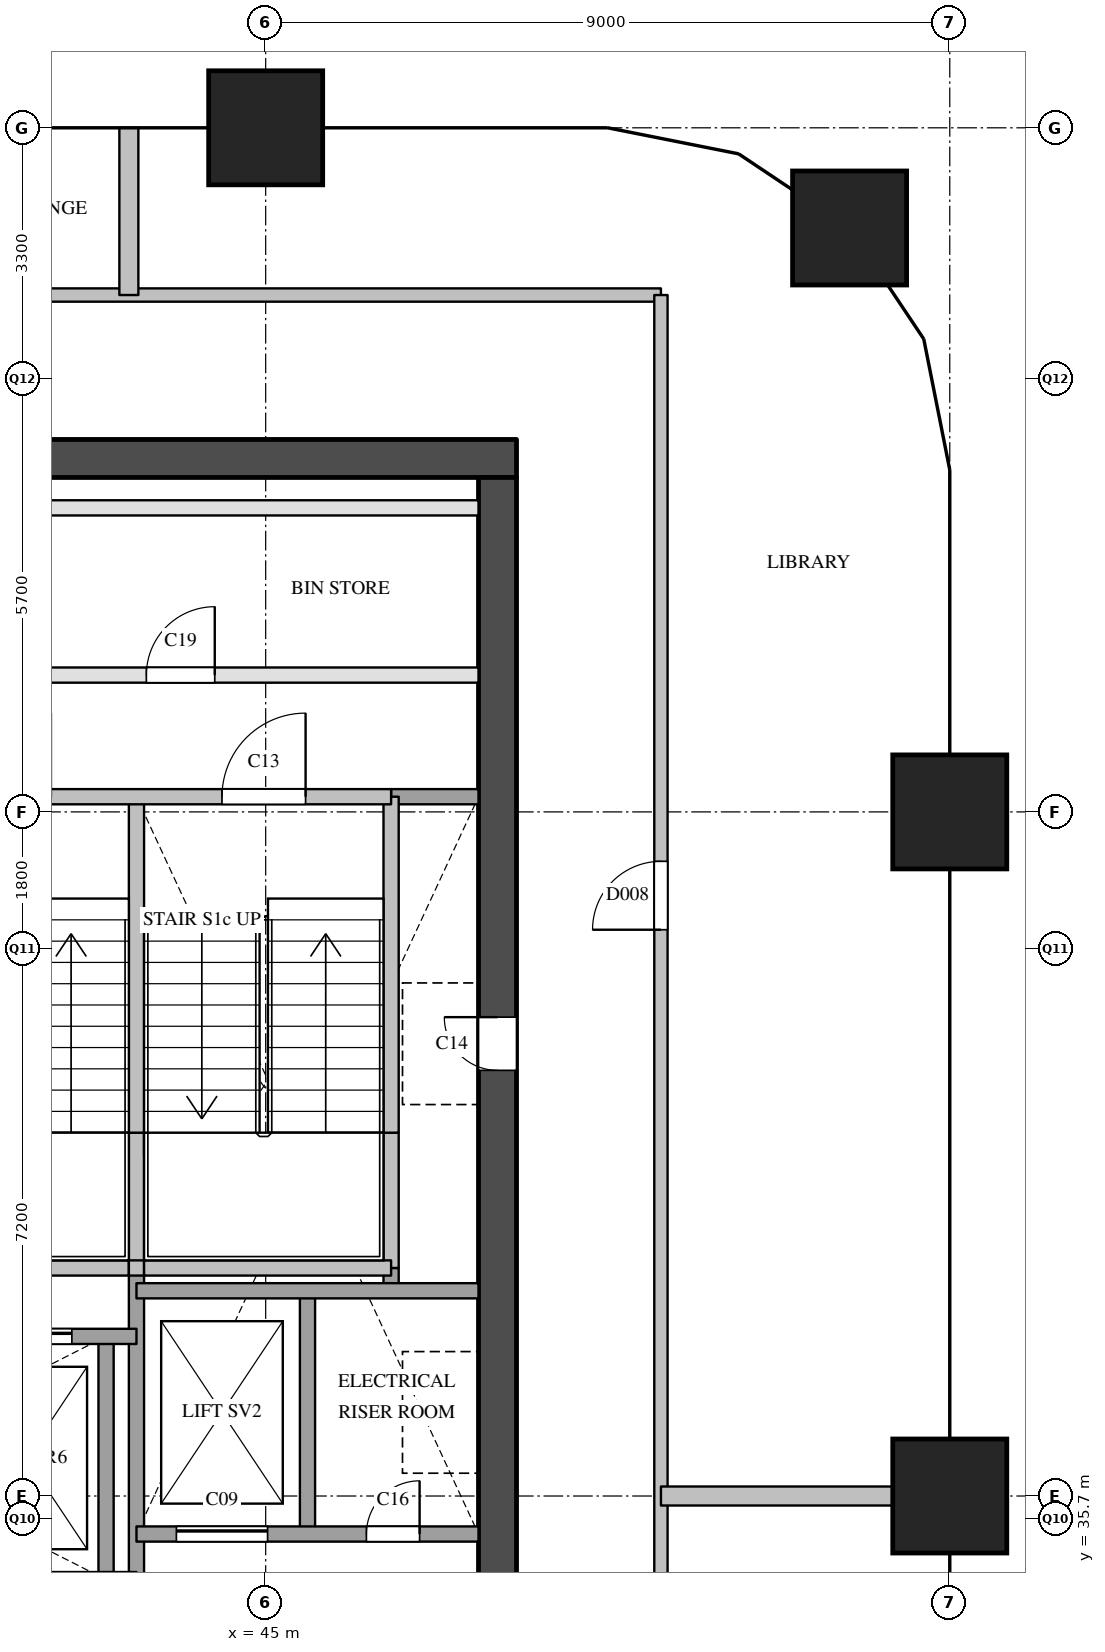
"""IFC4 building model, lengths in metres.
Left out: names, types, materials, properties, quantities, classifications, styles, units other than length and angle.
Written with IfcOpenShell. Run it as: python <this file> out.ifc"""

import sys

from ifc_helpers import new_model, si_unit, direction, frame, frame_2d, origin, origin_2d, place, context, subcontext, project, spatial, rectangle, extrude, element, fill, save


model = new_model("IFC4")
c1 = context("Model", 3, precision=1e-05, world=origin(), true_north=direction((0.0, 1.0)))
c2 = subcontext(c1, "Body", "Model", "MODEL_VIEW")
j1 = project(units=[si_unit("LENGTHUNIT", "METRE"), si_unit("PLANEANGLEUNIT", "RADIAN")], contexts=[c1])
p1 = place(None, origin())
s1 = spatial("IfcSite", under=j1, at=p1, CompositionType="ELEMENT")
p2 = place(p1, origin())
s2 = spatial("IfcBuilding", under=s1, at=p2, CompositionType="ELEMENT")
p3 = place(p2, frame((0.0, 0.0, 185.6)))
s3 = spatial("IfcBuildingStorey", under=s2, at=p3, CompositionType="ELEMENT", Elevation=185.6)
for number, where, z_axis, x_axis in (
    (1, (45.0, 54.0, 0.0), (0.0, 0.0, 1.0), (1.0, 0.0, 0.0)),
    (2, (54.0, 36.0, 0.0), (0.0, 0.0, 1.0), (1.0, 0.0, 0.0)),
    (3, (54.0, 45.0, 0.0), (0.0, 0.0, 1.0), (1.0, 0.0, 0.0)),
    (4, (52.682, 52.682, 0.0), (0.0, 0.0, 1.0), (1.0, 0.0, 0.0)),
):
    element("IfcColumn", number, at=place(p3, frame(where, z_axis=z_axis, x_axis=x_axis)), inside=s3, PredefinedType="COLUMN", context=c2, shape_type="SweptSolid", body=[
        extrude(rectangle(XDim=1.5, YDim=1.5, at=origin_2d()), origin(), (0.0, 0.0, 1.0), 3.9),
    ])
p4 = place(p3, frame((36.1, 49.65, 0.0), z_axis=(0.0, 0.0, 1.0), x_axis=(1.0, 0.0, 0.0)))
e5 = element("IfcWall", 5, at=p4, inside=s3, PredefinedType="SHEAR", context=c2, shape_type="SweptSolid", body=[
    extrude(rectangle(XDim=12.2, YDim=0.5, at=frame_2d((6.1, 0.0))), origin(), (0.0, 0.0, 1.0), 3.6),
])
p5 = place(p3, frame((48.05, 29.1, 0.0), z_axis=(0.0, 0.0, 1.0), x_axis=(0.0, 1.0, 0.0)))
e6 = element("IfcWall", 6, at=p5, inside=s3, PredefinedType="SHEAR", context=c2, shape_type="SweptSolid", body=[
    extrude(rectangle(XDim=20.3, YDim=0.5, at=frame_2d((10.15, 0.0))), origin(), (0.0, 0.0, 1.0), 3.6),
])
p6 = place(p5, frame((12.5, 0.0, 0.0)))
e7 = element("IfcOpeningElement", 7, at=p6, cuts=e6, PredefinedType="OPENING", context=c2, shape_type="SweptSolid", body=[
    extrude(rectangle(XDim=0.7, YDim=2.1, at=frame_2d((0.35, 1.05))), frame((0.0, 0.26, 0.0), z_axis=(0.0, -1.0, 0.0), x_axis=(1.0, 0.0, 0.0)), (0.0, 0.0, 1.0), 0.52),
])
p7 = place(p5, frame((3.9, 0.0, 0.0)))
e8 = element("IfcOpeningElement", 8, at=p7, cuts=e6, PredefinedType="OPENING", context=c2, shape_type="SweptSolid", body=[
    extrude(rectangle(XDim=1.8, YDim=2.1, at=frame_2d((0.9, 1.05))), frame((0.0, 0.26, 0.0), z_axis=(0.0, -1.0, 0.0), x_axis=(1.0, 0.0, 0.0)), (0.0, 0.0, 1.0), 0.52),
])
p8 = place(p3, frame((42.9, 34.9, 0.0), z_axis=(0.0, 0.0, 1.0), x_axis=(0.0, 1.0, 0.0)))
e9 = element("IfcWall", 9, at=p8, inside=s3, PredefinedType="SOLIDWALL", context=c2, shape_type="SweptSolid", body=[
    extrude(rectangle(XDim=3.2, YDim=0.2, at=frame_2d((1.6, 0.0))), origin(), (0.0, 0.0, 1.0), 3.6),
])
p9 = place(p3, frame((43.3, 29.1, 0.0), z_axis=(0.0, 0.0, 1.0), x_axis=(0.0, 1.0, 0.0)))
e10 = element("IfcWall", 10, at=p9, inside=s3, PredefinedType="SOLIDWALL", context=c2, shape_type="SweptSolid", body=[
    extrude(rectangle(XDim=9.9, YDim=0.2, at=frame_2d((4.95, 0.0))), origin(), (0.0, 0.0, 1.0), 3.6),
])
p10 = place(p3, frame((43.3, 39.0, 0.0), z_axis=(0.0, 0.0, 1.0), x_axis=(0.0, 1.0, 0.0)))
e11 = element("IfcWall", 11, at=p10, inside=s3, PredefinedType="SOLIDWALL", context=c2, shape_type="SweptSolid", body=[
    extrude(rectangle(XDim=1.78, YDim=0.2, at=frame_2d((0.89, 0.0))), origin(), (0.0, 0.0, 1.0), 3.6),
])
p11 = place(p3, frame((43.3, 40.78, 0.0), z_axis=(0.0, 0.0, 1.0), x_axis=(0.0, 1.0, 0.0)))
e12 = element("IfcWall", 12, at=p11, inside=s3, PredefinedType="SOLIDWALL", context=c2, shape_type="SweptSolid", body=[
    extrude(rectangle(XDim=4.42, YDim=0.2, at=frame_2d((2.21, 0.0))), origin(), (0.0, 0.0, 1.0), 3.6),
])
p12 = place(p3, frame((45.55, 35.5, 0.0), z_axis=(0.0, 0.0, 1.0), x_axis=(0.0, 1.0, 0.0)))
e13 = element("IfcWall", 13, at=p12, inside=s3, PredefinedType="SOLIDWALL", context=c2, shape_type="SweptSolid", body=[
    extrude(rectangle(XDim=3.2, YDim=0.2, at=frame_2d((1.6, 0.0))), origin(), (0.0, 0.0, 1.0), 3.6),
])
p13 = place(p3, frame((46.65, 38.7, 0.0), z_axis=(0.0, 0.0, 1.0), x_axis=(0.0, 1.0, 0.0)))
e14 = element("IfcWall", 14, at=p13, inside=s3, PredefinedType="SOLIDWALL", context=c2, shape_type="SweptSolid", body=[
    extrude(rectangle(XDim=0.3, YDim=0.2, at=frame_2d((0.15, 0.0))), origin(), (0.0, 0.0, 1.0), 3.6),
])
p14 = place(p3, frame((46.65, 39.0, 0.0), z_axis=(0.0, 0.0, 1.0), x_axis=(0.0, 1.0, 0.0)))
e15 = element("IfcWall", 15, at=p14, inside=s3, PredefinedType="SOLIDWALL", context=c2, shape_type="SweptSolid", body=[
    extrude(rectangle(XDim=1.78, YDim=0.2, at=frame_2d((0.89, 0.0))), origin(), (0.0, 0.0, 1.0), 3.6),
])
p15 = place(p3, frame((46.65, 40.78, 0.0), z_axis=(0.0, 0.0, 1.0), x_axis=(0.0, 1.0, 0.0)))
e16 = element("IfcWall", 16, at=p15, inside=s3, PredefinedType="SOLIDWALL", context=c2, shape_type="SweptSolid", body=[
    extrude(rectangle(XDim=4.42, YDim=0.2, at=frame_2d((2.21, 0.0))), origin(), (0.0, 0.0, 1.0), 3.6),
])
p16 = place(p3, frame((43.3, 35.5, 0.0), z_axis=(0.0, 0.0, 1.0), x_axis=(1.0, 0.0, 0.0)))
e17 = element("IfcWall", 17, at=p16, inside=s3, PredefinedType="SOLIDWALL", context=c2, shape_type="SweptSolid", body=[
    extrude(rectangle(XDim=4.5, YDim=0.2, at=frame_2d((2.25, 0.0))), origin(), (0.0, 0.0, 1.0), 3.6),
])
p17 = place(p16, frame((0.525, 0.0, 0.0)))
e18 = element("IfcOpeningElement", 18, at=p17, cuts=e17, PredefinedType="OPENING", context=c2, shape_type="SweptSolid", body=[
    extrude(rectangle(XDim=1.2, YDim=2.1, at=frame_2d((0.6, 1.05))), frame((0.0, 0.11, 0.0), z_axis=(0.0, -1.0, 0.0), x_axis=(1.0, 0.0, 0.0)), (0.0, 0.0, 1.0), 0.22),
])
p18 = place(p16, frame((3.025, 0.0, 0.0)))
e19 = element("IfcOpeningElement", 19, at=p18, cuts=e17, PredefinedType="OPENING", context=c2, shape_type="SweptSolid", body=[
    extrude(rectangle(XDim=0.7, YDim=2.1, at=frame_2d((0.35, 1.05))), frame((0.0, 0.11, 0.0), z_axis=(0.0, -1.0, 0.0), x_axis=(1.0, 0.0, 0.0)), (0.0, 0.0, 1.0), 0.22),
])
p19 = place(p3, frame((36.6, 38.1, 0.0), z_axis=(0.0, 0.0, 1.0), x_axis=(1.0, 0.0, 0.0)))
e20 = element("IfcWall", 20, at=p19, inside=s3, PredefinedType="SOLIDWALL", context=c2, shape_type="SweptSolid", body=[
    extrude(rectangle(XDim=6.7, YDim=0.2, at=frame_2d((3.35, 0.0))), origin(), (0.0, 0.0, 1.0), 3.6),
])
p20 = place(p19, frame((0.45, 0.0, 0.0)))
e21 = element("IfcOpeningElement", 21, at=p20, cuts=e20, PredefinedType="OPENING", context=c2, shape_type="SweptSolid", body=[
    extrude(rectangle(XDim=1.2, YDim=2.1, at=frame_2d((0.6, 1.05))), frame((0.0, 0.11, 0.0), z_axis=(0.0, -1.0, 0.0), x_axis=(1.0, 0.0, 0.0)), (0.0, 0.0, 1.0), 0.22),
])
p21 = place(p19, frame((2.55, 0.0, 0.0)))
e22 = element("IfcOpeningElement", 22, at=p21, cuts=e20, PredefinedType="OPENING", context=c2, shape_type="SweptSolid", body=[
    extrude(rectangle(XDim=1.2, YDim=2.1, at=frame_2d((0.6, 1.05))), frame((0.0, 0.11, 0.0), z_axis=(0.0, -1.0, 0.0), x_axis=(1.0, 0.0, 0.0)), (0.0, 0.0, 1.0), 0.22),
])
p22 = place(p19, frame((4.65, 0.0, 0.0)))
e23 = element("IfcOpeningElement", 23, at=p22, cuts=e20, PredefinedType="OPENING", context=c2, shape_type="SweptSolid", body=[
    extrude(rectangle(XDim=1.2, YDim=2.1, at=frame_2d((0.6, 1.05))), frame((0.0, 0.11, 0.0), z_axis=(0.0, -1.0, 0.0), x_axis=(1.0, 0.0, 0.0)), (0.0, 0.0, 1.0), 0.22),
])
p23 = place(p3, frame((43.3, 38.7, 0.0), z_axis=(0.0, 0.0, 1.0), x_axis=(1.0, 0.0, 0.0)))
e24 = element("IfcWall", 24, at=p23, inside=s3, PredefinedType="SOLIDWALL", context=c2, shape_type="SweptSolid", body=[
    extrude(rectangle(XDim=4.5, YDim=0.2, at=frame_2d((2.25, 0.0))), origin(), (0.0, 0.0, 1.0), 3.6),
])
p24 = place(p3, frame((40.05, 39.0, 0.0), z_axis=(0.0, 0.0, 1.0), x_axis=(1.0, 0.0, 0.0)))
e25 = element("IfcWall", 25, at=p24, inside=s3, PredefinedType="SOLIDWALL", context=c2, shape_type="SweptSolid", body=[
    extrude(rectangle(XDim=3.15, YDim=0.2, at=frame_2d((1.575, 0.0))), origin(), (0.0, 0.0, 1.0), 3.6),
])
p25 = place(p3, frame((43.2, 39.0, 0.0), z_axis=(0.0, 0.0, 1.0), x_axis=(1.0, 0.0, 0.0)))
e26 = element("IfcWall", 26, at=p25, inside=s3, PredefinedType="SOLIDWALL", context=c2, shape_type="SweptSolid", body=[
    extrude(rectangle(XDim=0.2, YDim=0.2, at=frame_2d((0.1, 0.0))), origin(), (0.0, 0.0, 1.0), 3.6),
])
p26 = place(p3, frame((43.4, 39.0, 0.0), z_axis=(0.0, 0.0, 1.0), x_axis=(1.0, 0.0, 0.0)))
e27 = element("IfcWall", 27, at=p26, inside=s3, PredefinedType="SOLIDWALL", context=c2, shape_type="SweptSolid", body=[
    extrude(rectangle(XDim=3.25, YDim=0.2, at=frame_2d((1.625, 0.0))), origin(), (0.0, 0.0, 1.0), 3.6),
])
p27 = place(p3, frame((46.65, 45.2, 0.0), z_axis=(0.0, 0.0, 1.0), x_axis=(1.0, 0.0, 0.0)))
e28 = element("IfcWall", 28, at=p27, inside=s3, PredefinedType="SOLIDWALL", context=c2, shape_type="SweptSolid", body=[
    extrude(rectangle(XDim=1.15, YDim=0.2, at=frame_2d((0.575, 0.0))), origin(), (0.0, 0.0, 1.0), 3.6),
])
p28 = place(p3, frame((36.6, 45.2, 0.0), z_axis=(0.0, 0.0, 1.0), x_axis=(1.0, 0.0, 0.0)))
e29 = element("IfcWall", 29, at=p28, inside=s3, PredefinedType="SOLIDWALL", context=c2, shape_type="SweptSolid", body=[
    extrude(rectangle(XDim=10.05, YDim=0.2, at=frame_2d((5.025, 0.0))), origin(), (0.0, 0.0, 1.0), 3.6),
])
p29 = place(p28, frame((1.125, 0.0, 0.0)))
e30 = element("IfcOpeningElement", 30, at=p29, cuts=e29, PredefinedType="OPENING", context=c2, shape_type="SweptSolid", body=[
    extrude(rectangle(XDim=1.1, YDim=2.1, at=frame_2d((0.55, 1.05))), frame((0.0, 0.11, 0.0), z_axis=(0.0, -1.0, 0.0), x_axis=(1.0, 0.0, 0.0)), (0.0, 0.0, 1.0), 0.22),
])
p30 = place(p28, frame((4.475, 0.0, 0.0)))
e31 = element("IfcOpeningElement", 31, at=p30, cuts=e29, PredefinedType="OPENING", context=c2, shape_type="SweptSolid", body=[
    extrude(rectangle(XDim=1.1, YDim=2.1, at=frame_2d((0.55, 1.05))), frame((0.0, 0.11, 0.0), z_axis=(0.0, -1.0, 0.0), x_axis=(1.0, 0.0, 0.0)), (0.0, 0.0, 1.0), 0.22),
])
p31 = place(p28, frame((7.825, 0.0, 0.0)))
e32 = element("IfcOpeningElement", 32, at=p31, cuts=e29, PredefinedType="OPENING", context=c2, shape_type="SweptSolid", body=[
    extrude(rectangle(XDim=1.1, YDim=2.1, at=frame_2d((0.55, 1.05))), frame((0.0, 0.11, 0.0), z_axis=(0.0, -1.0, 0.0), x_axis=(1.0, 0.0, 0.0)), (0.0, 0.0, 1.0), 0.22),
])
p32 = place(p3, frame((36.6, 46.8, 0.0), z_axis=(0.0, 0.0, 1.0), x_axis=(1.0, 0.0, 0.0)))
e33 = element("IfcWall", 33, at=p32, inside=s3, PredefinedType="PARTITIONING", context=c2, shape_type="SweptSolid", body=[
    extrude(rectangle(XDim=11.2, YDim=0.2, at=frame_2d((5.6, 0.0))), origin(), (0.0, 0.0, 1.0), 3.6),
])
p33 = place(p32, frame((1.23, 0.0, 0.0)))
e34 = element("IfcOpeningElement", 34, at=p33, cuts=e33, PredefinedType="OPENING", context=c2, shape_type="SweptSolid", body=[
    extrude(rectangle(XDim=0.9, YDim=2.1, at=frame_2d((0.45, 1.05))), frame((0.0, 0.11, 0.0), z_axis=(0.0, -1.0, 0.0), x_axis=(1.0, 0.0, 0.0)), (0.0, 0.0, 1.0), 0.22),
])
p34 = place(p32, frame((6.83, 0.0, 0.0)))
e35 = element("IfcOpeningElement", 35, at=p34, cuts=e33, PredefinedType="OPENING", context=c2, shape_type="SweptSolid", body=[
    extrude(rectangle(XDim=0.9, YDim=2.1, at=frame_2d((0.45, 1.05))), frame((0.0, 0.11, 0.0), z_axis=(0.0, -1.0, 0.0), x_axis=(1.0, 0.0, 0.0)), (0.0, 0.0, 1.0), 0.22),
])
p35 = place(p3, frame((36.6, 49.0, 0.0), z_axis=(0.0, 0.0, 1.0), x_axis=(1.0, 0.0, 0.0)))
e36 = element("IfcWall", 36, at=p35, inside=s3, PredefinedType="PARTITIONING", context=c2, shape_type="SweptSolid", body=[
    extrude(rectangle(XDim=11.2, YDim=0.2, at=frame_2d((5.6, 0.0))), origin(), (0.0, 0.0, 1.0), 3.6),
])
p36 = place(p3, frame((34.2, 51.8, 0.0), z_axis=(0.0, 0.0, 1.0), x_axis=(1.0, 0.0, 0.0)))
e37 = element("IfcWall", 37, at=p36, inside=s3, PredefinedType="PARTITIONING", context=c2, shape_type="SweptSolid", body=[
    extrude(rectangle(XDim=16.0, YDim=0.175, at=frame_2d((8.0, 0.0))), origin(), (0.0, 0.0, 1.0), 3.6),
])
p37 = place(p36, frame((4.95, 0.0, 0.0)))
e38 = element("IfcOpeningElement", 38, at=p37, cuts=e37, PredefinedType="OPENING", context=c2, shape_type="SweptSolid", body=[
    extrude(rectangle(XDim=0.9, YDim=2.1, at=frame_2d((0.45, 1.05))), frame((0.0, 0.097, 0.0), z_axis=(0.0, -1.0, 0.0), x_axis=(1.0, 0.0, 0.0)), (0.0, 0.0, 1.0), 0.195),
])
p38 = place(p3, frame((50.2, 28.5, 0.0), z_axis=(0.0, 0.0, 1.0), x_axis=(0.0, 1.0, 0.0)))
e39 = element("IfcWall", 39, at=p38, inside=s3, PredefinedType="PARTITIONING", context=c2, shape_type="SweptSolid", body=[
    extrude(rectangle(XDim=23.3, YDim=0.175, at=frame_2d((11.65, 0.0))), origin(), (0.0, 0.0, 1.0), 3.6),
])
p39 = place(p38, frame((3.3, 0.0, 0.0)))
e40 = element("IfcOpeningElement", 40, at=p39, cuts=e39, PredefinedType="OPENING", context=c2, shape_type="SweptSolid", body=[
    extrude(rectangle(XDim=0.9, YDim=2.1, at=frame_2d((0.45, 1.05))), frame((0.0, 0.097, 0.0), z_axis=(0.0, -1.0, 0.0), x_axis=(1.0, 0.0, 0.0)), (0.0, 0.0, 1.0), 0.195),
])
p40 = place(p38, frame((14.95, 0.0, 0.0)))
e41 = element("IfcOpeningElement", 41, at=p40, cuts=e39, PredefinedType="OPENING", context=c2, shape_type="SweptSolid", body=[
    extrude(rectangle(XDim=0.9, YDim=2.1, at=frame_2d((0.45, 1.05))), frame((0.0, 0.097, 0.0), z_axis=(0.0, -1.0, 0.0), x_axis=(1.0, 0.0, 0.0)), (0.0, 0.0, 1.0), 0.195),
])
p41 = place(p3, frame((50.2, 36.0, 0.0), z_axis=(0.0, 0.0, 1.0), x_axis=(1.0, 0.0, 0.0)))
e42 = element("IfcWall", 42, at=p41, inside=s3, PredefinedType="PARTITIONING", context=c2, shape_type="SweptSolid", body=[
    extrude(rectangle(XDim=3.8, YDim=0.25, at=frame_2d((1.9, 0.0))), origin(), (0.0, 0.0, 1.0), 3.6),
])
p42 = place(p3, frame((43.2, 51.8, 0.0), z_axis=(0.0, 0.0, 1.0), x_axis=(0.0, 1.0, 0.0)))
e43 = element("IfcWall", 43, at=p42, inside=s3, PredefinedType="PARTITIONING", context=c2, shape_type="SweptSolid", body=[
    extrude(rectangle(XDim=2.2, YDim=0.25, at=frame_2d((1.1, 0.0))), origin(), (0.0, 0.0, 1.0), 2.6),
])
p43 = place(p22, origin())
e44 = element("IfcDoor", 44, at=p43, inside=s3, OperationType="SLIDING_TO_LEFT", PredefinedType="DOOR", context=c2, shape_type="SweptSolid", body=[
    extrude(rectangle(XDim=1.2, YDim=2.1, at=frame_2d((0.6, 1.05))), frame((0.0, 0.025, 0.0), z_axis=(0.0, -1.0, 0.0), x_axis=(1.0, 0.0, 0.0)), (0.0, 0.0, 1.0), 0.05),
])
fill(e23, e44)
p44 = place(p17, origin())
e45 = element("IfcDoor", 45, at=p44, inside=s3, OperationType="SLIDING_TO_LEFT", PredefinedType="DOOR", context=c2, shape_type="SweptSolid", body=[
    extrude(rectangle(XDim=1.2, YDim=2.1, at=frame_2d((0.6, 1.05))), frame((0.0, 0.025, 0.0), z_axis=(0.0, -1.0, 0.0), x_axis=(1.0, 0.0, 0.0)), (0.0, 0.0, 1.0), 0.05),
])
fill(e18, e45)
p45 = place(p31, origin())
e46 = element("IfcDoor", 46, at=p45, inside=s3, OperationType="SINGLE_SWING_RIGHT", PredefinedType="DOOR", context=c2, shape_type="SweptSolid", body=[
    extrude(rectangle(XDim=1.1, YDim=2.1, at=frame_2d((0.55, 1.05))), frame((0.0, 0.025, 0.0), z_axis=(0.0, -1.0, 0.0), x_axis=(1.0, 0.0, 0.0)), (0.0, 0.0, 1.0), 0.05),
])
fill(e32, e46)
p46 = place(p6, origin())
e47 = element("IfcDoor", 47, at=p46, inside=s3, OperationType="SINGLE_SWING_RIGHT", PredefinedType="DOOR", context=c2, shape_type="SweptSolid", body=[
    extrude(rectangle(XDim=0.7, YDim=2.1, at=frame_2d((0.35, 1.05))), frame((0.0, 0.025, 0.0), z_axis=(0.0, -1.0, 0.0), x_axis=(1.0, 0.0, 0.0)), (0.0, 0.0, 1.0), 0.05),
])
fill(e7, e47)
p47 = place(p18, origin())
e48 = element("IfcDoor", 48, at=p47, inside=s3, OperationType="SINGLE_SWING_RIGHT", PredefinedType="DOOR", context=c2, shape_type="SweptSolid", body=[
    extrude(rectangle(XDim=0.7, YDim=2.1, at=frame_2d((0.35, 1.05))), frame((0.0, 0.025, 0.0), z_axis=(0.0, -1.0, 0.0), x_axis=(1.0, 0.0, 0.0)), (0.0, 0.0, 1.0), 0.05),
])
fill(e19, e48)
p48 = place(p34, origin())
e49 = element("IfcDoor", 49, at=p48, inside=s3, OperationType="SINGLE_SWING_RIGHT", PredefinedType="DOOR", context=c2, shape_type="SweptSolid", body=[
    extrude(rectangle(XDim=0.9, YDim=2.1, at=frame_2d((0.45, 1.05))), frame((0.0, 0.025, 0.0), z_axis=(0.0, -1.0, 0.0), x_axis=(1.0, 0.0, 0.0)), (0.0, 0.0, 1.0), 0.05),
])
fill(e35, e49)
p49 = place(p40, origin())
e50 = element("IfcDoor", 50, at=p49, inside=s3, OperationType="SINGLE_SWING_LEFT", PredefinedType="DOOR", context=c2, shape_type="SweptSolid", body=[
    extrude(rectangle(XDim=0.9, YDim=2.1, at=frame_2d((0.45, 1.05))), frame((0.0, 0.025, 0.0), z_axis=(0.0, -1.0, 0.0), x_axis=(1.0, 0.0, 0.0)), (0.0, 0.0, 1.0), 0.05),
])
fill(e41, e50)
save(model, sys.argv[1])
